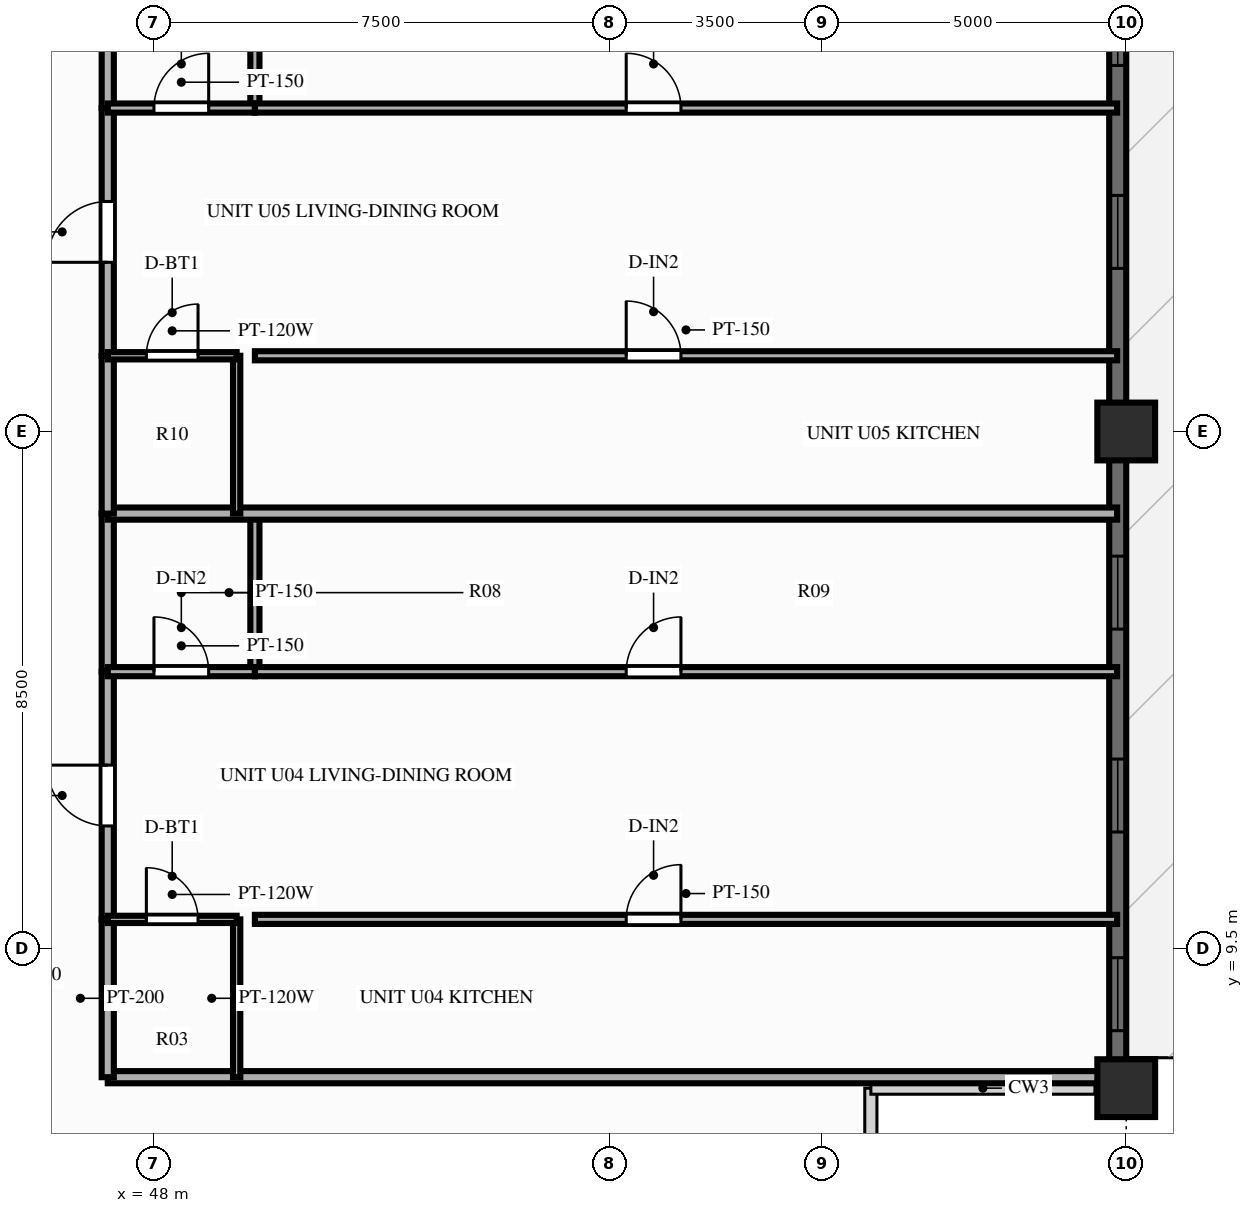
"""IFC4 building model, lengths in metres.
Left out: names, types, materials, properties, quantities, classifications, styles, units other than length and angle.
Written with IfcOpenShell. Run it as: python <this file> out.ifc"""

import sys

from ifc_helpers import new_model, si_unit, direction, frame, frame_2d, origin, origin_2d, place, context, subcontext, project, spatial, rectangle, extrude, source, transform, mapped, element, fill, save


model = new_model("IFC4")
c1 = context("Model", 3, precision=1e-05, world=origin(), true_north=direction((0.0, 1.0)))
c2 = subcontext(c1, "Body", "Model", "MODEL_VIEW")
j1 = project(units=[si_unit("LENGTHUNIT", "METRE"), si_unit("PLANEANGLEUNIT", "RADIAN")], contexts=[c1])
p1 = place(None, origin())
s1 = spatial("IfcSite", under=j1, at=p1, CompositionType="ELEMENT")
p2 = place(p1, origin())
s2 = spatial("IfcBuilding", under=s1, at=p2, CompositionType="ELEMENT")
p3 = place(p2, frame((0.0, 0.0, 98.85)))
s3 = spatial("IfcBuildingStorey", under=s2, at=p3, CompositionType="ELEMENT", Elevation=98.85)
m1 = source(origin(), c2, "Body", "SweptSolid", [
    extrude(rectangle(XDim=0.95, YDim=0.95, at=origin_2d()), origin(), (0.0, 0.0, 1.0), 3.0),
])
for number, where, z_axis, x_axis in (
    (1, (64.0, 7.2, 0.0), (0.0, 0.0, 1.0), (1.0, 0.0, 0.0)),
    (2, (64.0, 18.0, 0.0), (0.0, 0.0, 1.0), (1.0, 0.0, 0.0)),
):
    element("IfcColumn", number, at=place(p3, frame(where, z_axis=z_axis, x_axis=x_axis)), inside=s3, PredefinedType="COLUMN", context=c2, shape_type="MappedRepresentation", body=[
        mapped(m1, transform((0.0, 0.0, 0.0), scale=1.0)),
    ])
p4 = place(p3, frame((63.86, 7.2, 0.0), z_axis=(0.0, 0.0, 1.0), x_axis=(0.0, 1.0, 0.0)))
e3 = element("IfcWall", 3, at=p4, inside=s3, PredefinedType="SOLIDWALL", context=c2, shape_type="SweptSolid", body=[
    extrude(rectangle(XDim=39.6, YDim=0.28, at=frame_2d((19.8, 0.0))), origin(), (0.0, 0.0, 1.0), 2.28),
])
p5 = place(p4, frame((0.945, 0.0, 0.25)))
e4 = element("IfcOpeningElement", 4, at=p5, cuts=e3, PredefinedType="OPENING", context=c2, shape_type="SweptSolid", body=[
    extrude(rectangle(XDim=1.2, YDim=1.5, at=frame_2d((0.6, 0.75))), frame((0.0, 0.152, 0.0), z_axis=(0.0, -1.0, 0.0), x_axis=(1.0, 0.0, 0.0)), (0.0, 0.0, 1.0), 0.304),
])
p6 = place(p4, frame((4.213, 0.0, 0.25)))
e5 = element("IfcOpeningElement", 5, at=p6, cuts=e3, PredefinedType="OPENING", context=c2, shape_type="SweptSolid", body=[
    extrude(rectangle(XDim=1.2, YDim=1.5, at=frame_2d((0.6, 0.75))), frame((0.0, 0.152, 0.0), z_axis=(0.0, -1.0, 0.0), x_axis=(1.0, 0.0, 0.0)), (0.0, 0.0, 1.0), 0.304),
])
p7 = place(p4, frame((7.55, 0.0, 0.25)))
e6 = element("IfcOpeningElement", 6, at=p7, cuts=e3, PredefinedType="OPENING", context=c2, shape_type="SweptSolid", body=[
    extrude(rectangle(XDim=1.2, YDim=1.5, at=frame_2d((0.6, 0.75))), frame((0.0, 0.152, 0.0), z_axis=(0.0, -1.0, 0.0), x_axis=(1.0, 0.0, 0.0)), (0.0, 0.0, 1.0), 0.304),
])
p8 = place(p4, frame((13.483, 0.0, 0.25)))
e7 = element("IfcOpeningElement", 7, at=p8, cuts=e3, PredefinedType="OPENING", context=c2, shape_type="SweptSolid", body=[
    extrude(rectangle(XDim=1.2, YDim=1.5, at=frame_2d((0.6, 0.75))), frame((0.0, 0.152, 0.0), z_axis=(0.0, -1.0, 0.0), x_axis=(1.0, 0.0, 0.0)), (0.0, 0.0, 1.0), 0.304),
])
p9 = place(p4, frame((16.82, 0.0, 0.25)))
e8 = element("IfcOpeningElement", 8, at=p9, cuts=e3, PredefinedType="OPENING", context=c2, shape_type="SweptSolid", body=[
    extrude(rectangle(XDim=1.2, YDim=1.5, at=frame_2d((0.6, 0.75))), frame((0.0, 0.152, 0.0), z_axis=(0.0, -1.0, 0.0), x_axis=(1.0, 0.0, 0.0)), (0.0, 0.0, 1.0), 0.304),
])
p10 = place(p4, frame((19.2, 0.0, 0.25)))
e9 = element("IfcOpeningElement", 9, at=p10, cuts=e3, PredefinedType="OPENING", context=c2, shape_type="SweptSolid", body=[
    extrude(rectangle(XDim=1.2, YDim=1.5, at=frame_2d((0.6, 0.75))), frame((0.0, 0.152, 0.0), z_axis=(0.0, -1.0, 0.0), x_axis=(1.0, 0.0, 0.0)), (0.0, 0.0, 1.0), 0.304),
])
p11 = place(p4, frame((21.578, 0.0, 0.25)))
e10 = element("IfcOpeningElement", 10, at=p11, cuts=e3, PredefinedType="OPENING", context=c2, shape_type="SweptSolid", body=[
    extrude(rectangle(XDim=1.2, YDim=1.5, at=frame_2d((0.6, 0.75))), frame((0.0, 0.152, 0.0), z_axis=(0.0, -1.0, 0.0), x_axis=(1.0, 0.0, 0.0)), (0.0, 0.0, 1.0), 0.304),
])
p12 = place(p4, frame((26.313, 0.0, 0.0), z_axis=(0.0, 0.0, 1.0), x_axis=(-1.0, 0.0, 0.0)))
e11 = element("IfcOpeningElement", 11, at=p12, cuts=e3, PredefinedType="OPENING", context=c2, shape_type="SweptSolid", body=[
    extrude(rectangle(XDim=1.6, YDim=2.15, at=frame_2d((0.8, 1.075))), frame((0.0, 0.152, 0.0), z_axis=(0.0, -1.0, 0.0), x_axis=(1.0, 0.0, 0.0)), (0.0, 0.0, 1.0), 0.304),
])
p13 = place(p4, frame((29.305, 0.0, 0.25)))
e12 = element("IfcOpeningElement", 12, at=p13, cuts=e3, PredefinedType="OPENING", context=c2, shape_type="SweptSolid", body=[
    extrude(rectangle(XDim=0.7, YDim=1.5, at=frame_2d((0.35, 0.75))), frame((0.0, 0.152, 0.0), z_axis=(0.0, -1.0, 0.0), x_axis=(1.0, 0.0, 0.0)), (0.0, 0.0, 1.0), 0.304),
])
p14 = place(p4, frame((30.848, 0.0, 0.25)))
e13 = element("IfcOpeningElement", 13, at=p14, cuts=e3, PredefinedType="OPENING", context=c2, shape_type="SweptSolid", body=[
    extrude(rectangle(XDim=1.2, YDim=1.5, at=frame_2d((0.6, 0.75))), frame((0.0, 0.152, 0.0), z_axis=(0.0, -1.0, 0.0), x_axis=(1.0, 0.0, 0.0)), (0.0, 0.0, 1.0), 0.304),
])
p15 = place(p4, frame((34.183, 0.0, 0.25)))
e14 = element("IfcOpeningElement", 14, at=p15, cuts=e3, PredefinedType="OPENING", context=c2, shape_type="SweptSolid", body=[
    extrude(rectangle(XDim=1.2, YDim=1.5, at=frame_2d((0.6, 0.75))), frame((0.0, 0.152, 0.0), z_axis=(0.0, -1.0, 0.0), x_axis=(1.0, 0.0, 0.0)), (0.0, 0.0, 1.0), 0.304),
])
p16 = place(p4, frame((37.452, 0.0, 0.25)))
e15 = element("IfcOpeningElement", 15, at=p16, cuts=e3, PredefinedType="OPENING", context=c2, shape_type="SweptSolid", body=[
    extrude(rectangle(XDim=1.2, YDim=1.5, at=frame_2d((0.6, 0.75))), frame((0.0, 0.152, 0.0), z_axis=(0.0, -1.0, 0.0), x_axis=(1.0, 0.0, 0.0)), (0.0, 0.0, 1.0), 0.304),
])
p17 = place(p3, frame((47.25, 7.38, 0.0), z_axis=(0.0, 0.0, 1.0), x_axis=(1.0, 0.0, 0.0)))
e16 = element("IfcWall", 16, at=p17, inside=s3, PredefinedType="PARTITIONING", context=c2, shape_type="SweptSolid", body=[
    extrude(rectangle(XDim=16.6, YDim=0.2, at=frame_2d((8.3, 0.0))), origin(), (0.0, 0.0, 1.0), 2.79),
])
p18 = place(p3, frame((47.25, 7.38, 0.0), z_axis=(0.0, 0.0, 1.0), x_axis=(0.0, 1.0, 0.0)))
e17 = element("IfcWall", 17, at=p18, inside=s3, PredefinedType="PARTITIONING", context=c2, shape_type="SweptSolid", body=[
    extrude(rectangle(XDim=2.596, YDim=0.2, at=frame_2d((1.298, 0.0))), origin(), (0.0, 0.0, 1.0), 2.79),
])
p19 = place(p3, frame((47.25, 9.976, 0.0), z_axis=(0.0, 0.0, 1.0), x_axis=(0.0, 1.0, 0.0)))
e18 = element("IfcWall", 18, at=p19, inside=s3, PredefinedType="PARTITIONING", context=c2, shape_type="SweptSolid", body=[
    extrude(rectangle(XDim=4.074, YDim=0.2, at=frame_2d((2.037, 0.0))), origin(), (0.0, 0.0, 1.0), 2.79),
])
p20 = place(p19, frame((1.537, 0.0, 0.0)))
e19 = element("IfcOpeningElement", 19, at=p20, cuts=e18, PredefinedType="OPENING", context=c2, shape_type="SweptSolid", body=[
    extrude(rectangle(XDim=1.0, YDim=2.15, at=frame_2d((0.5, 1.075))), frame((0.0, 0.112, 0.0), z_axis=(0.0, -1.0, 0.0), x_axis=(1.0, 0.0, 0.0)), (0.0, 0.0, 1.0), 0.224),
])
p21 = place(p3, frame((47.25, 14.05, 0.0), z_axis=(0.0, 0.0, 1.0), x_axis=(0.0, 1.0, 0.0)))
e20 = element("IfcWall", 20, at=p21, inside=s3, PredefinedType="PARTITIONING", context=c2, shape_type="SweptSolid", body=[
    extrude(rectangle(XDim=2.6, YDim=0.2, at=frame_2d((1.3, 0.0))), origin(), (0.0, 0.0, 1.0), 2.79),
])
p22 = place(p3, frame((49.37, 7.38, 0.0), z_axis=(0.0, 0.0, 1.0), x_axis=(0.0, 1.0, 0.0)))
e21 = element("IfcWall", 21, at=p22, inside=s3, PredefinedType="PARTITIONING", context=c2, shape_type="SweptSolid", body=[
    extrude(rectangle(XDim=2.596, YDim=0.12, at=frame_2d((1.298, 0.0))), origin(), (0.0, 0.0, 1.0), 2.79),
])
p23 = place(p3, frame((49.67, 14.05, 0.0), z_axis=(0.0, 0.0, 1.0), x_axis=(0.0, 1.0, 0.0)))
e22 = element("IfcWall", 22, at=p23, inside=s3, PredefinedType="PARTITIONING", context=c2, shape_type="SweptSolid", body=[
    extrude(rectangle(XDim=2.6, YDim=0.15, at=frame_2d((1.3, 0.0))), origin(), (0.0, 0.0, 1.0), 2.79),
])
p24 = place(p3, frame((47.25, 9.976, 0.0), z_axis=(0.0, 0.0, 1.0), x_axis=(1.0, 0.0, 0.0)))
e23 = element("IfcWall", 23, at=p24, inside=s3, PredefinedType="PARTITIONING", context=c2, shape_type="SweptSolid", body=[
    extrude(rectangle(XDim=2.12, YDim=0.12, at=frame_2d((1.06, 0.0))), origin(), (0.0, 0.0, 1.0), 2.79),
])
p25 = place(p24, frame((0.635, 0.0, 0.0)))
e24 = element("IfcOpeningElement", 24, at=p25, cuts=e23, PredefinedType="OPENING", context=c2, shape_type="SweptSolid", body=[
    extrude(rectangle(XDim=0.85, YDim=2.05, at=frame_2d((0.425, 1.025))), frame((0.0, 0.072, 0.0), z_axis=(0.0, -1.0, 0.0), x_axis=(1.0, 0.0, 0.0)), (0.0, 0.0, 1.0), 0.144),
])
p26 = place(p3, frame((49.67, 9.976, 0.0), z_axis=(0.0, 0.0, 1.0), x_axis=(1.0, 0.0, 0.0)))
e25 = element("IfcWall", 25, at=p26, inside=s3, PredefinedType="PARTITIONING", context=c2, shape_type="SweptSolid", body=[
    extrude(rectangle(XDim=14.18, YDim=0.15, at=frame_2d((7.09, 0.0))), origin(), (0.0, 0.0, 1.0), 2.79),
])
p27 = place(p26, frame((6.107, 0.0, 0.0)))
e26 = element("IfcOpeningElement", 26, at=p27, cuts=e25, PredefinedType="OPENING", context=c2, shape_type="SweptSolid", body=[
    extrude(rectangle(XDim=0.9, YDim=2.1, at=frame_2d((0.45, 1.05))), frame((0.0, 0.087, 0.0), z_axis=(0.0, -1.0, 0.0), x_axis=(1.0, 0.0, 0.0)), (0.0, 0.0, 1.0), 0.174),
])
p28 = place(p3, frame((47.25, 14.05, 0.0), z_axis=(0.0, 0.0, 1.0), x_axis=(1.0, 0.0, 0.0)))
e27 = element("IfcWall", 27, at=p28, inside=s3, PredefinedType="PARTITIONING", context=c2, shape_type="SweptSolid", body=[
    extrude(rectangle(XDim=2.42, YDim=0.15, at=frame_2d((1.21, 0.0))), origin(), (0.0, 0.0, 1.0), 2.79),
])
p29 = place(p28, frame((0.76, 0.0, 0.0)))
e28 = element("IfcOpeningElement", 28, at=p29, cuts=e27, PredefinedType="OPENING", context=c2, shape_type="SweptSolid", body=[
    extrude(rectangle(XDim=0.9, YDim=2.1, at=frame_2d((0.45, 1.05))), frame((0.0, 0.087, 0.0), z_axis=(0.0, -1.0, 0.0), x_axis=(1.0, 0.0, 0.0)), (0.0, 0.0, 1.0), 0.174),
])
p30 = place(p3, frame((49.67, 14.05, 0.0), z_axis=(0.0, 0.0, 1.0), x_axis=(1.0, 0.0, 0.0)))
e29 = element("IfcWall", 29, at=p30, inside=s3, PredefinedType="PARTITIONING", context=c2, shape_type="SweptSolid", body=[
    extrude(rectangle(XDim=14.18, YDim=0.15, at=frame_2d((7.09, 0.0))), origin(), (0.0, 0.0, 1.0), 2.79),
])
p31 = place(p30, frame((6.107, 0.0, 0.0)))
e30 = element("IfcOpeningElement", 30, at=p31, cuts=e29, PredefinedType="OPENING", context=c2, shape_type="SweptSolid", body=[
    extrude(rectangle(XDim=0.9, YDim=2.1, at=frame_2d((0.45, 1.05))), frame((0.0, 0.087, 0.0), z_axis=(0.0, -1.0, 0.0), x_axis=(1.0, 0.0, 0.0)), (0.0, 0.0, 1.0), 0.174),
])
p32 = place(p3, frame((47.25, 16.65, 0.0), z_axis=(0.0, 0.0, 1.0), x_axis=(1.0, 0.0, 0.0)))
e31 = element("IfcWall", 31, at=p32, inside=s3, PredefinedType="PARTITIONING", context=c2, shape_type="SweptSolid", body=[
    extrude(rectangle(XDim=16.6, YDim=0.2, at=frame_2d((8.3, 0.0))), origin(), (0.0, 0.0, 1.0), 2.79),
])
p33 = place(p3, frame((47.25, 16.65, 0.0), z_axis=(0.0, 0.0, 1.0), x_axis=(0.0, 1.0, 0.0)))
e32 = element("IfcWall", 32, at=p33, inside=s3, PredefinedType="PARTITIONING", context=c2, shape_type="SweptSolid", body=[
    extrude(rectangle(XDim=2.596, YDim=0.2, at=frame_2d((1.298, 0.0))), origin(), (0.0, 0.0, 1.0), 2.79),
])
p34 = place(p3, frame((47.25, 19.246, 0.0), z_axis=(0.0, 0.0, 1.0), x_axis=(0.0, 1.0, 0.0)))
e33 = element("IfcWall", 33, at=p34, inside=s3, PredefinedType="PARTITIONING", context=c2, shape_type="SweptSolid", body=[
    extrude(rectangle(XDim=4.074, YDim=0.2, at=frame_2d((2.037, 0.0))), origin(), (0.0, 0.0, 1.0), 2.79),
])
p35 = place(p34, frame((1.537, 0.0, 0.0)))
e34 = element("IfcOpeningElement", 34, at=p35, cuts=e33, PredefinedType="OPENING", context=c2, shape_type="SweptSolid", body=[
    extrude(rectangle(XDim=1.0, YDim=2.15, at=frame_2d((0.5, 1.075))), frame((0.0, 0.112, 0.0), z_axis=(0.0, -1.0, 0.0), x_axis=(1.0, 0.0, 0.0)), (0.0, 0.0, 1.0), 0.224),
])
p36 = place(p3, frame((47.25, 23.32, 0.0), z_axis=(0.0, 0.0, 1.0), x_axis=(0.0, 1.0, 0.0)))
e35 = element("IfcWall", 35, at=p36, inside=s3, PredefinedType="PARTITIONING", context=c2, shape_type="SweptSolid", body=[
    extrude(rectangle(XDim=2.6, YDim=0.2, at=frame_2d((1.3, 0.0))), origin(), (0.0, 0.0, 1.0), 2.79),
])
p37 = place(p3, frame((49.37, 16.65, 0.0), z_axis=(0.0, 0.0, 1.0), x_axis=(0.0, 1.0, 0.0)))
e36 = element("IfcWall", 36, at=p37, inside=s3, PredefinedType="PARTITIONING", context=c2, shape_type="SweptSolid", body=[
    extrude(rectangle(XDim=2.596, YDim=0.12, at=frame_2d((1.298, 0.0))), origin(), (0.0, 0.0, 1.0), 2.79),
])
p38 = place(p3, frame((49.67, 23.32, 0.0), z_axis=(0.0, 0.0, 1.0), x_axis=(0.0, 1.0, 0.0)))
e37 = element("IfcWall", 37, at=p38, inside=s3, PredefinedType="PARTITIONING", context=c2, shape_type="SweptSolid", body=[
    extrude(rectangle(XDim=2.6, YDim=0.15, at=frame_2d((1.3, 0.0))), origin(), (0.0, 0.0, 1.0), 2.79),
])
p39 = place(p3, frame((47.25, 19.246, 0.0), z_axis=(0.0, 0.0, 1.0), x_axis=(1.0, 0.0, 0.0)))
e38 = element("IfcWall", 38, at=p39, inside=s3, PredefinedType="PARTITIONING", context=c2, shape_type="SweptSolid", body=[
    extrude(rectangle(XDim=2.12, YDim=0.12, at=frame_2d((1.06, 0.0))), origin(), (0.0, 0.0, 1.0), 2.79),
])
p40 = place(p39, frame((0.635, 0.0, 0.0)))
e39 = element("IfcOpeningElement", 39, at=p40, cuts=e38, PredefinedType="OPENING", context=c2, shape_type="SweptSolid", body=[
    extrude(rectangle(XDim=0.85, YDim=2.05, at=frame_2d((0.425, 1.025))), frame((0.0, 0.072, 0.0), z_axis=(0.0, -1.0, 0.0), x_axis=(1.0, 0.0, 0.0)), (0.0, 0.0, 1.0), 0.144),
])
p41 = place(p3, frame((49.67, 19.246, 0.0), z_axis=(0.0, 0.0, 1.0), x_axis=(1.0, 0.0, 0.0)))
e40 = element("IfcWall", 40, at=p41, inside=s3, PredefinedType="PARTITIONING", context=c2, shape_type="SweptSolid", body=[
    extrude(rectangle(XDim=14.18, YDim=0.15, at=frame_2d((7.09, 0.0))), origin(), (0.0, 0.0, 1.0), 2.79),
])
p42 = place(p41, frame((6.107, 0.0, 0.0)))
e41 = element("IfcOpeningElement", 41, at=p42, cuts=e40, PredefinedType="OPENING", context=c2, shape_type="SweptSolid", body=[
    extrude(rectangle(XDim=0.9, YDim=2.1, at=frame_2d((0.45, 1.05))), frame((0.0, 0.087, 0.0), z_axis=(0.0, -1.0, 0.0), x_axis=(1.0, 0.0, 0.0)), (0.0, 0.0, 1.0), 0.174),
])
p43 = place(p3, frame((47.25, 23.32, 0.0), z_axis=(0.0, 0.0, 1.0), x_axis=(1.0, 0.0, 0.0)))
e42 = element("IfcWall", 42, at=p43, inside=s3, PredefinedType="PARTITIONING", context=c2, shape_type="SweptSolid", body=[
    extrude(rectangle(XDim=2.42, YDim=0.15, at=frame_2d((1.21, 0.0))), origin(), (0.0, 0.0, 1.0), 2.79),
])
p44 = place(p43, frame((0.76, 0.0, 0.0)))
e43 = element("IfcOpeningElement", 43, at=p44, cuts=e42, PredefinedType="OPENING", context=c2, shape_type="SweptSolid", body=[
    extrude(rectangle(XDim=0.9, YDim=2.1, at=frame_2d((0.45, 1.05))), frame((0.0, 0.087, 0.0), z_axis=(0.0, -1.0, 0.0), x_axis=(1.0, 0.0, 0.0)), (0.0, 0.0, 1.0), 0.174),
])
p45 = place(p3, frame((49.67, 23.32, 0.0), z_axis=(0.0, 0.0, 1.0), x_axis=(1.0, 0.0, 0.0)))
e44 = element("IfcWall", 44, at=p45, inside=s3, PredefinedType="PARTITIONING", context=c2, shape_type="SweptSolid", body=[
    extrude(rectangle(XDim=14.18, YDim=0.15, at=frame_2d((7.09, 0.0))), origin(), (0.0, 0.0, 1.0), 2.79),
])
p46 = place(p45, frame((6.107, 0.0, 0.0)))
e45 = element("IfcOpeningElement", 45, at=p46, cuts=e44, PredefinedType="OPENING", context=c2, shape_type="SweptSolid", body=[
    extrude(rectangle(XDim=0.9, YDim=2.1, at=frame_2d((0.45, 1.05))), frame((0.0, 0.087, 0.0), z_axis=(0.0, -1.0, 0.0), x_axis=(1.0, 0.0, 0.0)), (0.0, 0.0, 1.0), 0.174),
])
m2 = source(origin(), c2, "Body", "SweptSolid", [
    extrude(rectangle(XDim=1.2, YDim=1.5, at=frame_2d((0.6, 0.75))), frame((0.0, 0.03, 0.0), z_axis=(0.0, -1.0, 0.0), x_axis=(1.0, 0.0, 0.0)), (0.0, 0.0, 1.0), 0.06),
])
p47 = place(p5, origin())
e46 = element("IfcWindow", 46, at=p47, inside=s3, PartitioningType="SINGLE_PANEL", PredefinedType="WINDOW", context=c2, shape_type="MappedRepresentation", body=[
    mapped(m2, transform((0.0, 0.0, 0.0), scale=1.0)),
])
fill(e4, e46)
p48 = place(p6, origin())
e47 = element("IfcWindow", 47, at=p48, inside=s3, PartitioningType="SINGLE_PANEL", PredefinedType="WINDOW", context=c2, shape_type="MappedRepresentation", body=[
    mapped(m2, transform((0.0, 0.0, 0.0), scale=1.0)),
])
fill(e5, e47)
p49 = place(p7, origin())
e48 = element("IfcWindow", 48, at=p49, inside=s3, PartitioningType="SINGLE_PANEL", PredefinedType="WINDOW", context=c2, shape_type="MappedRepresentation", body=[
    mapped(m2, transform((0.0, 0.0, 0.0), scale=1.0)),
])
fill(e6, e48)
p50 = place(p8, origin())
e49 = element("IfcWindow", 49, at=p50, inside=s3, PartitioningType="SINGLE_PANEL", PredefinedType="WINDOW", context=c2, shape_type="MappedRepresentation", body=[
    mapped(m2, transform((0.0, 0.0, 0.0), scale=1.0)),
])
fill(e7, e49)
p51 = place(p9, origin())
e50 = element("IfcWindow", 50, at=p51, inside=s3, PartitioningType="SINGLE_PANEL", PredefinedType="WINDOW", context=c2, shape_type="MappedRepresentation", body=[
    mapped(m2, transform((0.0, 0.0, 0.0), scale=1.0)),
])
fill(e8, e50)
m3 = source(origin(), c2, "Body", "SweptSolid", [
    extrude(rectangle(XDim=1.0, YDim=2.15, at=frame_2d((0.5, 1.075))), frame((0.0, 0.025, 0.0), z_axis=(0.0, -1.0, 0.0), x_axis=(1.0, 0.0, 0.0)), (0.0, 0.0, 1.0), 0.05),
])
p52 = place(p20, origin())
e51 = element("IfcDoor", 51, at=p52, inside=s3, OperationType="SINGLE_SWING_RIGHT", PredefinedType="DOOR", context=c2, shape_type="MappedRepresentation", body=[
    mapped(m3, transform((0.0, 0.0, 0.0), scale=1.0)),
])
fill(e19, e51)
m4 = source(origin(), c2, "Body", "SweptSolid", [
    extrude(rectangle(XDim=0.85, YDim=2.05, at=frame_2d((0.425, 1.025))), frame((0.0, 0.025, 0.0), z_axis=(0.0, -1.0, 0.0), x_axis=(1.0, 0.0, 0.0)), (0.0, 0.0, 1.0), 0.05),
])
p53 = place(p25, origin())
e52 = element("IfcDoor", 52, at=p53, inside=s3, OperationType="SINGLE_SWING_LEFT", PredefinedType="DOOR", context=c2, shape_type="MappedRepresentation", body=[
    mapped(m4, transform((0.0, 0.0, 0.0), scale=1.0)),
])
fill(e24, e52)
m5 = source(origin(), c2, "Body", "SweptSolid", [
    extrude(rectangle(XDim=0.9, YDim=2.1, at=frame_2d((0.45, 1.05))), frame((0.0, 0.025, 0.0), z_axis=(0.0, -1.0, 0.0), x_axis=(1.0, 0.0, 0.0)), (0.0, 0.0, 1.0), 0.05),
])
p54 = place(p27, origin())
e53 = element("IfcDoor", 53, at=p54, inside=s3, OperationType="SINGLE_SWING_RIGHT", PredefinedType="DOOR", context=c2, shape_type="MappedRepresentation", body=[
    mapped(m5, transform((0.0, 0.0, 0.0), scale=1.0)),
])
fill(e26, e53)
p55 = place(p29, origin())
e54 = element("IfcDoor", 54, at=p55, inside=s3, OperationType="SINGLE_SWING_LEFT", PredefinedType="DOOR", context=c2, shape_type="MappedRepresentation", body=[
    mapped(m5, transform((0.0, 0.0, 0.0), scale=1.0)),
])
fill(e28, e54)
p56 = place(p31, origin())
e55 = element("IfcDoor", 55, at=p56, inside=s3, OperationType="SINGLE_SWING_RIGHT", PredefinedType="DOOR", context=c2, shape_type="MappedRepresentation", body=[
    mapped(m5, transform((0.0, 0.0, 0.0), scale=1.0)),
])
fill(e30, e55)
p57 = place(p35, origin())
e56 = element("IfcDoor", 56, at=p57, inside=s3, OperationType="SINGLE_SWING_LEFT", PredefinedType="DOOR", context=c2, shape_type="MappedRepresentation", body=[
    mapped(m3, transform((0.0, 0.0, 0.0), scale=1.0)),
])
fill(e34, e56)
p58 = place(p40, origin())
e57 = element("IfcDoor", 57, at=p58, inside=s3, OperationType="SINGLE_SWING_RIGHT", PredefinedType="DOOR", context=c2, shape_type="MappedRepresentation", body=[
    mapped(m4, transform((0.0, 0.0, 0.0), scale=1.0)),
])
fill(e39, e57)
p59 = place(p42, origin())
e58 = element("IfcDoor", 58, at=p59, inside=s3, OperationType="SINGLE_SWING_LEFT", PredefinedType="DOOR", context=c2, shape_type="MappedRepresentation", body=[
    mapped(m5, transform((0.0, 0.0, 0.0), scale=1.0)),
])
fill(e41, e58)
p60 = place(p44, origin())
e59 = element("IfcDoor", 59, at=p60, inside=s3, OperationType="SINGLE_SWING_RIGHT", PredefinedType="DOOR", context=c2, shape_type="MappedRepresentation", body=[
    mapped(m5, transform((0.0, 0.0, 0.0), scale=1.0)),
])
fill(e43, e59)
p61 = place(p46, origin())
e60 = element("IfcDoor", 60, at=p61, inside=s3, OperationType="SINGLE_SWING_LEFT", PredefinedType="DOOR", context=c2, shape_type="MappedRepresentation", body=[
    mapped(m5, transform((0.0, 0.0, 0.0), scale=1.0)),
])
fill(e45, e60)
save(model, sys.argv[1])
